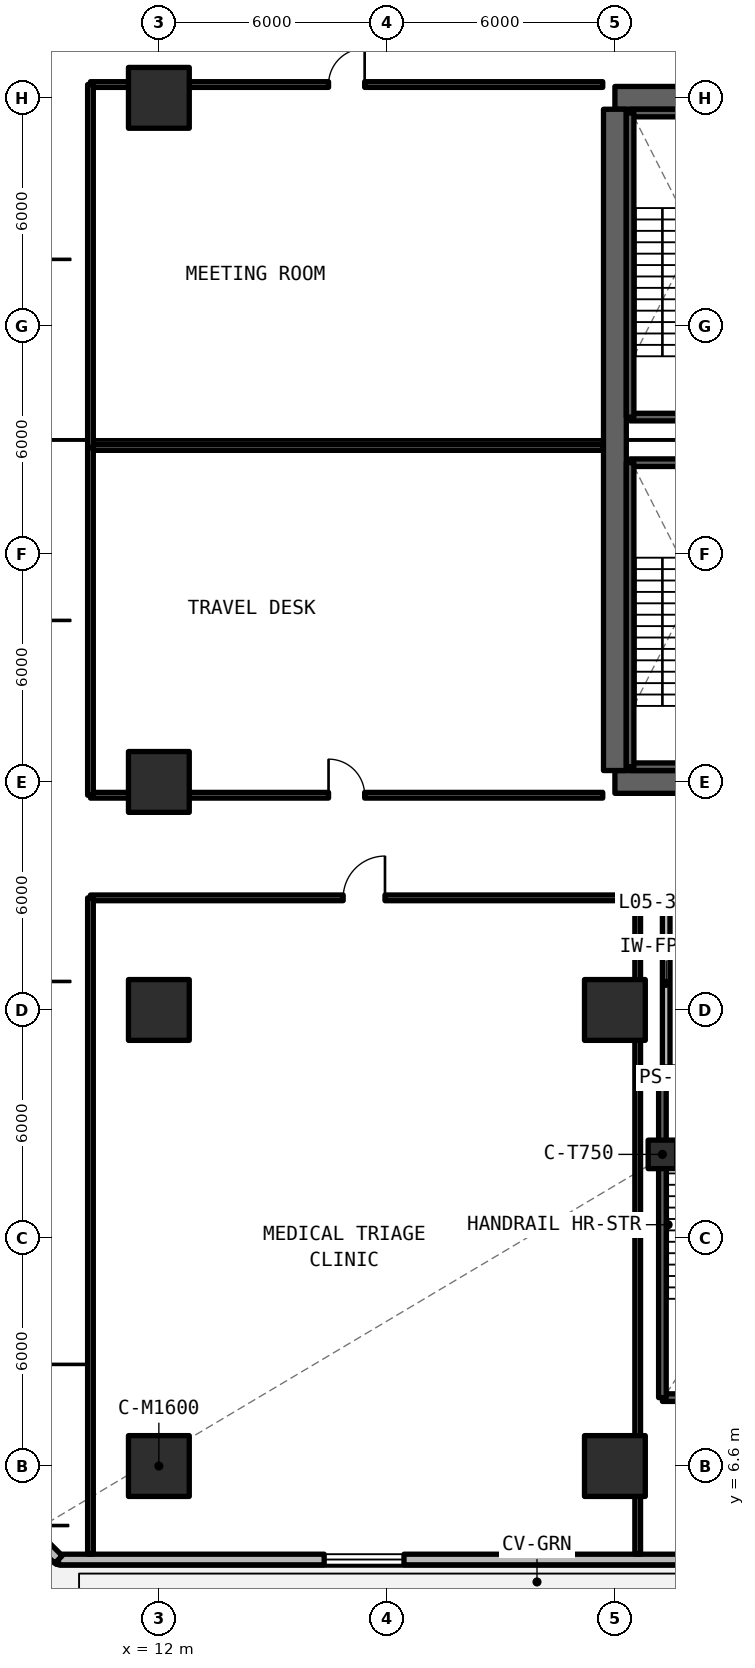
"""IFC4 building model, lengths in metres.
Left out: names, types, materials, properties, quantities, classifications, styles, units other than length and angle.
Written with IfcOpenShell. Run it as: python <this file> out.ifc"""

import sys

from ifc_helpers import new_model, si_unit, direction, frame, frame_2d, origin, origin_2d, place, context, subcontext, project, spatial, rectangle, extrude, element, fill, save


model = new_model("IFC4")
c1 = context("Model", 3, precision=1e-05, world=origin(), true_north=direction((0.0, 1.0)))
c2 = subcontext(c1, "Body", "Model", "MODEL_VIEW")
j1 = project(units=[si_unit("LENGTHUNIT", "METRE"), si_unit("PLANEANGLEUNIT", "RADIAN")], contexts=[c1])
p1 = place(None, origin())
s1 = spatial("IfcSite", under=j1, at=p1, CompositionType="ELEMENT")
p2 = place(p1, origin())
s2 = spatial("IfcBuilding", under=s1, at=p2, CompositionType="ELEMENT")
p3 = place(p2, frame((0.0, 0.0, 19.47)))
s3 = spatial("IfcBuildingStorey", under=s2, at=p3, CompositionType="ELEMENT", Elevation=19.47)
for number, where, z_axis, x_axis in (
    (1, (24.0, 24.6, 0.0), (0.0, 0.0, 1.0), (1.0, 0.0, 0.0)),
    (2, (36.0, 42.6, 0.0), (0.0, 0.0, 1.0), (-1.0, 0.0, 0.0)),
):
    element("IfcWall", number, at=place(p3, frame(where, z_axis=z_axis, x_axis=x_axis)), inside=s3, PredefinedType="SHEAR", context=c2, shape_type="SweptSolid", body=[
        extrude(rectangle(XDim=12.0, YDim=0.6, at=frame_2d((6.0, 0.0))), origin(), (0.0, 0.0, 1.0), 4.62),
    ])
p4 = place(p3, frame((24.0, 24.9, 0.0), z_axis=(0.0, 0.0, 1.0), x_axis=(0.0, 1.0, 0.0)))
e3 = element("IfcWall", 3, at=p4, inside=s3, PredefinedType="SHEAR", context=c2, shape_type="SweptSolid", body=[
    extrude(rectangle(XDim=17.4, YDim=0.6, at=frame_2d((8.7, 0.0))), origin(), (0.0, 0.0, 1.0), 4.62),
])
for number, where, z_axis, x_axis in (
    (4, (12.0, 6.6, 0.0), (0.0, 0.0, 1.0), (1.0, 0.0, 0.0)),
    (5, (12.0, 24.6, 0.0), (0.0, 0.0, 1.0), (1.0, 0.0, 0.0)),
    (6, (12.0, 42.6, 0.0), (0.0, 0.0, 1.0), (1.0, 0.0, 0.0)),
    (7, (24.0, 6.6, 0.0), (0.0, 0.0, 1.0), (1.0, 0.0, 0.0)),
    (8, (12.0, 18.6, 0.0), (0.0, 0.0, 1.0), (1.0, 0.0, 0.0)),
    (9, (24.0, 18.6, 0.0), (0.0, 0.0, 1.0), (1.0, 0.0, 0.0)),
):
    element("IfcColumn", number, at=place(p3, frame(where, z_axis=z_axis, x_axis=x_axis)), inside=s3, PredefinedType="COLUMN", context=c2, shape_type="SweptSolid", body=[
        extrude(rectangle(XDim=1.6, YDim=1.6, at=origin_2d()), origin(), (0.0, 0.0, 1.0), 4.62),
    ])
p5 = place(p3, frame((25.25, 14.8, 0.0), z_axis=(0.0, 0.0, 1.0), x_axis=(1.0, 0.0, 0.0)))
e10 = element("IfcColumn", 10, at=p5, inside=s3, PredefinedType="COLUMN", context=c2, shape_type="SweptSolid", body=[
    extrude(rectangle(XDim=0.75, YDim=0.75, at=origin_2d()), origin(), (0.0, 0.0, 1.0), 4.27),
])
p6 = place(p3, frame((9.358, 4.14, 0.0), z_axis=(0.0, 0.0, 1.0), x_axis=(1.0, 0.0, 0.0)))
e11 = element("IfcWall", 11, at=p6, inside=s3, PredefinedType="SOLIDWALL", context=c2, shape_type="SweptSolid", body=[
    extrude(rectangle(XDim=95.284, YDim=0.28, at=frame_2d((47.642, 0.0))), origin(), (0.0, 0.0, 1.0), 4.27),
])
p7 = place(p6, frame((46.642, 0.0, 0.0)))
e12 = element("IfcOpeningElement", 12, at=p7, cuts=e11, PredefinedType="OPENING", context=c2, shape_type="SweptSolid", body=[
    extrude(rectangle(XDim=1.5, YDim=2.2, at=frame_2d((0.75, 1.1))), frame((0.0, 0.15, 0.0), z_axis=(0.0, -1.0, 0.0), x_axis=(1.0, 0.0, 0.0)), (0.0, 0.0, 1.0), 0.3),
])
p8 = place(p6, frame((26.242, 0.0, 0.78)))
e13 = element("IfcOpeningElement", 13, at=p8, cuts=e11, PredefinedType="OPENING", context=c2, shape_type="SweptSolid", body=[
    extrude(rectangle(XDim=2.1, YDim=1.66, at=frame_2d((1.05, 0.83))), frame((0.0, 0.15, 0.0), z_axis=(0.0, -1.0, 0.0), x_axis=(1.0, 0.0, 0.0)), (0.0, 0.0, 1.0), 0.3),
])
p9 = place(p6, frame((52.192, 0.0, 0.78)))
e14 = element("IfcOpeningElement", 14, at=p9, cuts=e11, PredefinedType="OPENING", context=c2, shape_type="SweptSolid", body=[
    extrude(rectangle(XDim=2.1, YDim=1.66, at=frame_2d((1.05, 0.83))), frame((0.0, 0.15, 0.0), z_axis=(0.0, -1.0, 0.0), x_axis=(1.0, 0.0, 0.0)), (0.0, 0.0, 1.0), 0.3),
])
p10 = place(p6, frame((61.192, 0.0, 0.78)))
e15 = element("IfcOpeningElement", 15, at=p10, cuts=e11, PredefinedType="OPENING", context=c2, shape_type="SweptSolid", body=[
    extrude(rectangle(XDim=2.1, YDim=1.66, at=frame_2d((1.05, 0.83))), frame((0.0, 0.15, 0.0), z_axis=(0.0, -1.0, 0.0), x_axis=(1.0, 0.0, 0.0)), (0.0, 0.0, 1.0), 0.3),
])
p11 = place(p6, frame((69.692, 0.0, 0.78)))
e16 = element("IfcOpeningElement", 16, at=p11, cuts=e11, PredefinedType="OPENING", context=c2, shape_type="SweptSolid", body=[
    extrude(rectangle(XDim=2.1, YDim=1.66, at=frame_2d((1.05, 0.83))), frame((0.0, 0.15, 0.0), z_axis=(0.0, -1.0, 0.0), x_axis=(1.0, 0.0, 0.0)), (0.0, 0.0, 1.0), 0.3),
])
p12 = place(p6, frame((6.992, 0.0, 0.78)))
e17 = element("IfcOpeningElement", 17, at=p12, cuts=e11, PredefinedType="OPENING", context=c2, shape_type="SweptSolid", body=[
    extrude(rectangle(XDim=2.1, YDim=1.66, at=frame_2d((1.05, 0.83))), frame((0.0, 0.15, 0.0), z_axis=(0.0, -1.0, 0.0), x_axis=(1.0, 0.0, 0.0)), (0.0, 0.0, 1.0), 0.3),
])
p13 = place(p6, frame((16.967, 0.0, 0.78)))
e18 = element("IfcOpeningElement", 18, at=p13, cuts=e11, PredefinedType="OPENING", context=c2, shape_type="SweptSolid", body=[
    extrude(rectangle(XDim=2.1, YDim=1.66, at=frame_2d((1.05, 0.83))), frame((0.0, 0.15, 0.0), z_axis=(0.0, -1.0, 0.0), x_axis=(1.0, 0.0, 0.0)), (0.0, 0.0, 1.0), 0.3),
])
p14 = place(p6, frame((83.938, 0.0, 0.78)))
e19 = element("IfcOpeningElement", 19, at=p14, cuts=e11, PredefinedType="OPENING", context=c2, shape_type="SweptSolid", body=[
    extrude(rectangle(XDim=2.1, YDim=1.66, at=frame_2d((1.05, 0.83))), frame((0.0, 0.15, 0.0), z_axis=(0.0, -1.0, 0.0), x_axis=(1.0, 0.0, 0.0)), (0.0, 0.0, 1.0), 0.3),
])
p15 = place(p3, frame((7.34, 6.158, 0.0), z_axis=(0.0, 0.0, 1.0), x_axis=(0.707064005301, -0.707149554485, 0.0)))
e20 = element("IfcWall", 20, at=p15, inside=s3, PredefinedType="SOLIDWALL", context=c2, shape_type="SweptSolid", body=[
    extrude(rectangle(XDim=2.854, YDim=0.28, at=frame_2d((1.427, 0.0))), origin(), (0.0, 0.0, 1.0), 4.27),
])
p16 = place(p15, frame((0.727, 0.0, 0.78)))
e21 = element("IfcOpeningElement", 21, at=p16, cuts=e20, PredefinedType="OPENING", context=c2, shape_type="SweptSolid", body=[
    extrude(rectangle(XDim=1.4, YDim=1.65, at=frame_2d((0.7, 0.825))), frame((0.0, 0.15, 0.0), z_axis=(0.0, -1.0, 0.0), x_axis=(1.0, 0.0, 0.0)), (0.0, 0.0, 1.0), 0.3),
])
p17 = place(p3, frame((25.35, 17.0, 0.0), z_axis=(0.0, 0.0, 1.0), x_axis=(0.0, 1.0, 0.0)))
e22 = element("IfcWall", 22, at=p17, inside=s3, PredefinedType="SOLIDWALL", context=c2, shape_type="SweptSolid", body=[
    extrude(rectangle(XDim=4.6, YDim=0.2, at=frame_2d((2.3, 0.0))), origin(), (0.0, 0.0, 1.0), 3.49),
])
p18 = place(p3, frame((10.2, 24.25, 0.0), z_axis=(0.0, 0.0, 1.0), x_axis=(1.0, 0.0, 0.0)))
e23 = element("IfcWall", 23, at=p18, inside=s3, PredefinedType="SOLIDWALL", context=c2, shape_type="SweptSolid", body=[
    extrude(rectangle(XDim=13.48, YDim=0.15, at=frame_2d((6.74, 0.0))), origin(), (0.0, 0.0, 1.0), 3.49),
])
p19 = place(p18, frame((6.265, 0.0, 0.0)))
e24 = element("IfcOpeningElement", 24, at=p19, cuts=e23, PredefinedType="OPENING", context=c2, shape_type="SweptSolid", body=[
    extrude(rectangle(XDim=0.95, YDim=2.15, at=frame_2d((0.475, 1.075))), frame((0.0, 0.085, 0.0), z_axis=(0.0, -1.0, 0.0), x_axis=(1.0, 0.0, 0.0)), (0.0, 0.0, 1.0), 0.17),
])
p20 = place(p3, frame((10.2, 33.4, 0.0), z_axis=(0.0, 0.0, 1.0), x_axis=(1.0, 0.0, 0.0)))
e25 = element("IfcWall", 25, at=p20, inside=s3, PredefinedType="SOLIDWALL", context=c2, shape_type="SweptSolid", body=[
    extrude(rectangle(XDim=13.48, YDim=0.15, at=frame_2d((6.74, 0.0))), origin(), (0.0, 0.0, 1.0), 3.49),
])
p21 = place(p3, frame((10.2, 24.25, 0.0), z_axis=(0.0, 0.0, 1.0), x_axis=(0.0, 1.0, 0.0)))
e26 = element("IfcWall", 26, at=p21, inside=s3, PredefinedType="SOLIDWALL", context=c2, shape_type="SweptSolid", body=[
    extrude(rectangle(XDim=9.15, YDim=0.15, at=frame_2d((4.575, 0.0))), origin(), (0.0, 0.0, 1.0), 3.49),
])
p22 = place(p3, frame((10.2, 42.95, 0.0), z_axis=(0.0, 0.0, 1.0), x_axis=(1.0, 0.0, 0.0)))
e27 = element("IfcWall", 27, at=p22, inside=s3, PredefinedType="SOLIDWALL", context=c2, shape_type="SweptSolid", body=[
    extrude(rectangle(XDim=13.48, YDim=0.15, at=frame_2d((6.74, 0.0))), origin(), (0.0, 0.0, 1.0), 3.49),
])
p23 = place(p22, frame((6.265, 0.0, 0.0)))
e28 = element("IfcOpeningElement", 28, at=p23, cuts=e27, PredefinedType="OPENING", context=c2, shape_type="SweptSolid", body=[
    extrude(rectangle(XDim=0.95, YDim=2.15, at=frame_2d((0.475, 1.075))), frame((0.0, 0.085, 0.0), z_axis=(0.0, -1.0, 0.0), x_axis=(1.0, 0.0, 0.0)), (0.0, 0.0, 1.0), 0.17),
])
p24 = place(p3, frame((10.2, 33.4, 0.0), z_axis=(0.0, 0.0, 1.0), x_axis=(0.0, 1.0, 0.0)))
e29 = element("IfcWall", 29, at=p24, inside=s3, PredefinedType="SOLIDWALL", context=c2, shape_type="SweptSolid", body=[
    extrude(rectangle(XDim=9.55, YDim=0.15, at=frame_2d((4.775, 0.0))), origin(), (0.0, 0.0, 1.0), 3.49),
])
p25 = place(p3, frame((10.2, 21.55, 0.0), z_axis=(0.0, 0.0, 1.0), x_axis=(1.0, 0.0, 0.0)))
e30 = element("IfcWall", 30, at=p25, inside=s3, PredefinedType="SOLIDWALL", context=c2, shape_type="SweptSolid", body=[
    extrude(rectangle(XDim=14.4, YDim=0.15, at=frame_2d((7.2, 0.0))), origin(), (0.0, 0.0, 1.0), 3.49),
])
p26 = place(p25, frame((6.65, 0.0, 0.0)))
e31 = element("IfcOpeningElement", 31, at=p26, cuts=e30, PredefinedType="OPENING", context=c2, shape_type="SweptSolid", body=[
    extrude(rectangle(XDim=1.1, YDim=2.15, at=frame_2d((0.55, 1.075))), frame((0.0, 0.085, 0.0), z_axis=(0.0, -1.0, 0.0), x_axis=(1.0, 0.0, 0.0)), (0.0, 0.0, 1.0), 0.17),
])
for number, where, z_axis, x_axis in (
    (32, (10.2, 4.28, 0.0), (0.0, 0.0, 1.0), (0.0, 1.0, 0.0)),
    (33, (24.6, 4.28, 0.0), (0.0, 0.0, 1.0), (0.0, 1.0, 0.0)),
):
    element("IfcWall", number, at=place(p3, frame(where, z_axis=z_axis, x_axis=x_axis)), inside=s3, PredefinedType="SOLIDWALL", context=c2, shape_type="SweptSolid", body=[
        extrude(rectangle(XDim=17.27, YDim=0.15, at=frame_2d((8.635, 0.0))), origin(), (0.0, 0.0, 1.0), 3.49),
    ])
for number, where, z_axis, x_axis in (
    (34, (24.4, 25.0, 0.0), (0.0, 0.0, 1.0), (1.0, 0.0, 0.0)),
    (35, (27.8, 33.0, 0.0), (0.0, 0.0, 1.0), (-1.0, 0.0, 0.0)),
):
    element("IfcWall", number, at=place(p3, frame(where, z_axis=z_axis, x_axis=x_axis)), inside=s3, PredefinedType="SOLIDWALL", context=c2, shape_type="SweptSolid", body=[
        extrude(rectangle(XDim=3.4, YDim=0.2, at=frame_2d((1.7, 0.0))), origin(), (0.0, 0.0, 1.0), 4.62),
    ])
p27 = place(p3, frame((24.4, 33.0, 0.0), z_axis=(0.0, 0.0, 1.0), x_axis=(0.0, -1.0, 0.0)))
e36 = element("IfcWall", 36, at=p27, inside=s3, PredefinedType="SOLIDWALL", context=c2, shape_type="SweptSolid", body=[
    extrude(rectangle(XDim=8.0, YDim=0.2, at=frame_2d((4.0, 0.0))), origin(), (0.0, 0.0, 1.0), 4.62),
])
for number, where, z_axis, x_axis in (
    (37, (24.4, 34.2, 0.0), (0.0, 0.0, 1.0), (1.0, 0.0, 0.0)),
    (38, (27.8, 42.2, 0.0), (0.0, 0.0, 1.0), (-1.0, 0.0, 0.0)),
):
    element("IfcWall", number, at=place(p3, frame(where, z_axis=z_axis, x_axis=x_axis)), inside=s3, PredefinedType="SOLIDWALL", context=c2, shape_type="SweptSolid", body=[
        extrude(rectangle(XDim=3.4, YDim=0.2, at=frame_2d((1.7, 0.0))), origin(), (0.0, 0.0, 1.0), 4.62),
    ])
p28 = place(p3, frame((24.4, 42.2, 0.0), z_axis=(0.0, 0.0, 1.0), x_axis=(0.0, -1.0, 0.0)))
e39 = element("IfcWall", 39, at=p28, inside=s3, PredefinedType="SOLIDWALL", context=c2, shape_type="SweptSolid", body=[
    extrude(rectangle(XDim=8.0, YDim=0.2, at=frame_2d((4.0, 0.0))), origin(), (0.0, 0.0, 1.0), 4.62),
])
p29 = place(p3, frame((25.25, 8.4, 0.0), z_axis=(0.0, 0.0, 1.0), x_axis=(1.0, 0.0, 0.0)))
e40 = element("IfcWall", 40, at=p29, inside=s3, PredefinedType="SOLIDWALL", context=c2, shape_type="SweptSolid", body=[
    extrude(rectangle(XDim=4.4, YDim=0.2, at=frame_2d((2.2, 0.0))), origin(), (0.0, 0.0, 1.0), 4.62),
])
p30 = place(p3, frame((29.65, 17.0, 0.0), z_axis=(0.0, 0.0, 1.0), x_axis=(-1.0, 0.0, 0.0)))
e41 = element("IfcWall", 41, at=p30, inside=s3, PredefinedType="SOLIDWALL", context=c2, shape_type="SweptSolid", body=[
    extrude(rectangle(XDim=4.4, YDim=0.2, at=frame_2d((2.2, 0.0))), origin(), (0.0, 0.0, 1.0), 4.62),
])
p31 = place(p30, frame((1.625, 0.0, 0.0)))
e42 = element("IfcOpeningElement", 42, at=p31, cuts=e41, PredefinedType="OPENING", context=c2, shape_type="SweptSolid", body=[
    extrude(rectangle(XDim=1.15, YDim=2.15, at=frame_2d((0.575, 1.075))), frame((0.0, 0.11, 0.0), z_axis=(0.0, -1.0, 0.0), x_axis=(1.0, 0.0, 0.0)), (0.0, 0.0, 1.0), 0.22),
])
p32 = place(p3, frame((25.25, 17.0, 0.0), z_axis=(0.0, 0.0, 1.0), x_axis=(0.0, -1.0, 0.0)))
e43 = element("IfcWall", 43, at=p32, inside=s3, PredefinedType="SOLIDWALL", context=c2, shape_type="SweptSolid", body=[
    extrude(rectangle(XDim=8.6, YDim=0.2, at=frame_2d((4.3, 0.0))), origin(), (0.0, 0.0, 1.0), 4.62),
])
p33 = place(p12, origin())
e44 = element("IfcWindow", 44, at=p33, inside=s3, PartitioningType="SINGLE_PANEL", PredefinedType="WINDOW", context=c2, shape_type="SweptSolid", body=[
    extrude(rectangle(XDim=2.1, YDim=1.66, at=frame_2d((1.05, 0.83))), frame((0.0, 0.03, 0.0), z_axis=(0.0, -1.0, 0.0), x_axis=(1.0, 0.0, 0.0)), (0.0, 0.0, 1.0), 0.06),
])
fill(e17, e44)
p34 = place(p19, origin())
e45 = element("IfcDoor", 45, at=p34, inside=s3, OperationType="SINGLE_SWING_LEFT", PredefinedType="DOOR", context=c2, shape_type="SweptSolid", body=[
    extrude(rectangle(XDim=0.95, YDim=2.15, at=frame_2d((0.475, 1.075))), frame((0.0, 0.025, 0.0), z_axis=(0.0, -1.0, 0.0), x_axis=(1.0, 0.0, 0.0)), (0.0, 0.0, 1.0), 0.05),
])
fill(e24, e45)
p35 = place(p23, origin())
e46 = element("IfcDoor", 46, at=p35, inside=s3, OperationType="SINGLE_SWING_RIGHT", PredefinedType="DOOR", context=c2, shape_type="SweptSolid", body=[
    extrude(rectangle(XDim=0.95, YDim=2.15, at=frame_2d((0.475, 1.075))), frame((0.0, 0.025, 0.0), z_axis=(0.0, -1.0, 0.0), x_axis=(1.0, 0.0, 0.0)), (0.0, 0.0, 1.0), 0.05),
])
fill(e28, e46)
p36 = place(p26, origin())
e47 = element("IfcDoor", 47, at=p36, inside=s3, OperationType="SINGLE_SWING_RIGHT", PredefinedType="DOOR", context=c2, shape_type="SweptSolid", body=[
    extrude(rectangle(XDim=1.1, YDim=2.15, at=frame_2d((0.55, 1.075))), frame((0.0, 0.025, 0.0), z_axis=(0.0, -1.0, 0.0), x_axis=(1.0, 0.0, 0.0)), (0.0, 0.0, 1.0), 0.05),
])
fill(e31, e47)
save(model, sys.argv[1])
